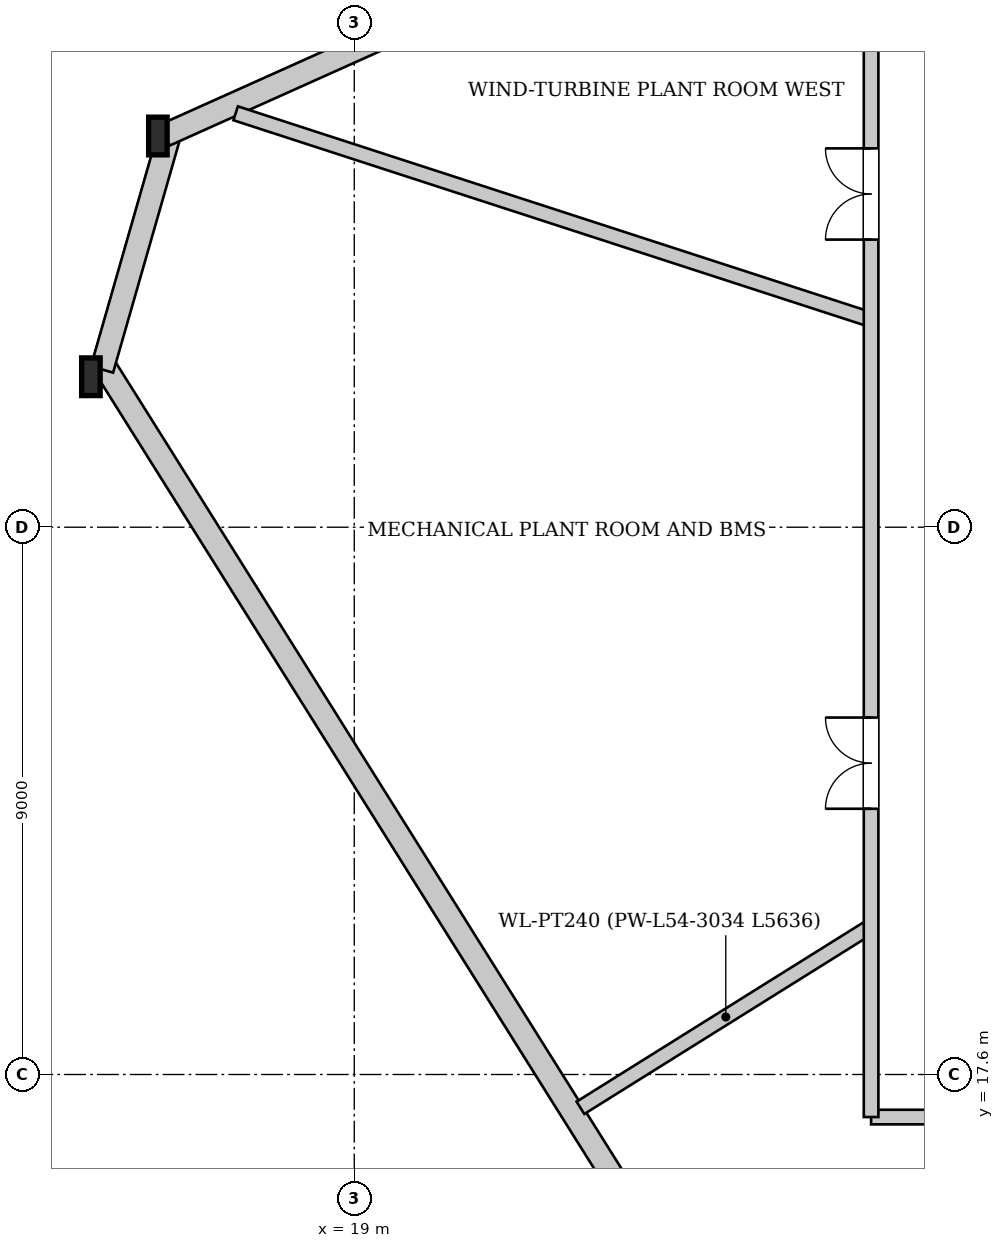
"""IFC4 building model, lengths in metres.
Left out: names, types, materials, properties, quantities, classifications, styles, units other than length and angle.
Written with IfcOpenShell. Run it as: python <this file> out.ifc"""

import sys

from ifc_helpers import new_model, si_unit, direction, frame, frame_2d, origin, origin_2d, place, context, subcontext, project, spatial, rectangle, i_section, extrude, source, transform, mapped, element, fill, save


model = new_model("IFC4")
c1 = context("Model", 3, precision=1e-05, world=origin(), true_north=direction((0.0, 1.0)))
c2 = subcontext(c1, "Body", "Model", "MODEL_VIEW")
j1 = project(units=[si_unit("LENGTHUNIT", "METRE"), si_unit("PLANEANGLEUNIT", "RADIAN")], contexts=[c1])
p1 = place(None, origin())
s1 = spatial("IfcSite", under=j1, at=p1, CompositionType="ELEMENT")
p2 = place(p1, origin())
s2 = spatial("IfcBuilding", under=s1, at=p2, CompositionType="ELEMENT")
p3 = place(p2, frame((0.0, 0.0, 204.3)))
s3 = spatial("IfcBuildingStorey", under=s2, at=p3, CompositionType="ELEMENT", Elevation=204.3)
m1 = source(origin(), c2, "Body", "SweptSolid", [
    extrude(i_section(OverallWidth=0.305, OverallDepth=0.62, WebThickness=0.021, FlangeThickness=0.04, at=origin_2d()), origin(), (0.0, 0.0, 1.0), 5.149),
])
p4 = place(p3, frame((15.809, 33.223, 0.0), z_axis=(-0.014792046228, -0.0735335375, 0.997183039482), x_axis=(0.980361267352, -0.19721000349, 0.0)))
e1 = element("IfcColumn", 1, at=p4, inside=s3, PredefinedType="COLUMN", context=c2, shape_type="MappedRepresentation", body=[
    mapped(m1, transform((0.0, 0.0, 0.0), x_axis=(1.0, 0.0, 0.0), y_axis=(0.0, 1.0, 0.0), z_axis=(0.0, 0.0, 1.0), scale=1.0)),
])
m2 = source(origin(), c2, "Body", "SweptSolid", [
    extrude(i_section(OverallWidth=0.305, OverallDepth=0.62, WebThickness=0.021, FlangeThickness=0.04, at=origin_2d()), origin(), (0.0, 0.0, 1.0), 5.146),
])
p5 = place(p3, frame((14.668, 29.247, 0.0), z_axis=(4.743756e-05, -0.066981834351, 0.997754193986), x_axis=(0.999999749216, 0.00070821512, 0.0)))
e2 = element("IfcColumn", 2, at=p5, inside=s3, PredefinedType="COLUMN", context=c2, shape_type="MappedRepresentation", body=[
    mapped(m2, transform((0.0, 0.0, 0.0), x_axis=(1.0, 0.0, 0.0), y_axis=(0.0, 1.0, 0.0), z_axis=(0.0, 0.0, 1.0), scale=1.0)),
])
p6 = place(p3, frame((24.242, 14.344, 0.0), z_axis=(0.0, 0.0, 1.0), x_axis=(-0.531419317525, 0.847108912101, 0.0)))
e3 = element("IfcWall", 3, at=p6, inside=s3, PredefinedType="SOLIDWALL", context=c2, shape_type="SweptSolid", body=[
    extrude(rectangle(XDim=17.712, YDim=0.38, at=frame_2d((8.856, 0.0))), origin(), (0.0, 0.0, 1.0), 4.572),
])
p7 = place(p3, frame((14.851, 29.194, 0.0), z_axis=(0.0, 0.0, 1.0), x_axis=(0.27564088165, 0.961260684915, 0.0)))
e4 = element("IfcWall", 4, at=p7, inside=s3, PredefinedType="SOLIDWALL", context=c2, shape_type="SweptSolid", body=[
    extrude(rectangle(XDim=4.136, YDim=0.38, at=frame_2d((2.068, 0.0))), origin(), (0.0, 0.0, 1.0), 4.572),
])
p8 = place(p3, frame((15.886, 33.05, 0.0), z_axis=(0.0, 0.0, 1.0), x_axis=(0.912383830261, 0.409335737845, 0.0)))
e5 = element("IfcWall", 5, at=p8, inside=s3, PredefinedType="SOLIDWALL", context=c2, shape_type="SweptSolid", body=[
    extrude(rectangle(XDim=22.569, YDim=0.38, at=frame_2d((11.284, 0.0))), origin(), (0.0, 0.0, 1.0), 4.572),
])
p9 = place(p3, frame((27.5, 20.039, 0.0), z_axis=(0.0, 0.0, 1.0), x_axis=(-0.848042103881, -0.529928853758, 0.0)))
e6 = element("IfcWall", 6, at=p9, inside=s3, PredefinedType="PARTITIONING", context=c2, shape_type="SweptSolid", body=[
    extrude(rectangle(XDim=5.636, YDim=0.24, at=frame_2d((2.818, 0.0))), origin(), (0.0, 0.0, 1.0), 5.08),
])
p10 = place(p3, frame((27.5, 30.012, 0.0), z_axis=(0.0, 0.0, 1.0), x_axis=(-0.951062149422, 0.308999656855, 0.0)))
e7 = element("IfcWall", 7, at=p10, inside=s3, PredefinedType="PARTITIONING", context=c2, shape_type="SweptSolid", body=[
    extrude(rectangle(XDim=10.988, YDim=0.24, at=frame_2d((5.494, 0.0))), origin(), (0.0, 0.0, 1.0), 5.08),
])
p11 = place(p3, frame((27.5, 16.9, 0.0), z_axis=(0.0, 0.0, 1.0), x_axis=(1.0, 0.0, 0.0)))
e8 = element("IfcWall", 8, at=p11, inside=s3, PredefinedType="PARTITIONING", context=c2, shape_type="SweptSolid", body=[
    extrude(rectangle(XDim=21.0, YDim=0.24, at=frame_2d((10.5, 0.0))), origin(), (0.0, 0.0, 1.0), 5.08),
])
p12 = place(p11, frame((5.64, 0.0, 0.0)))
e9 = element("IfcOpeningElement", 9, at=p12, cuts=e8, PredefinedType="OPENING", context=c2, shape_type="SweptSolid", body=[
    extrude(rectangle(XDim=1.32, YDim=2.2, at=frame_2d((0.66, 1.1))), frame((0.0, 0.13, 0.0), z_axis=(0.0, -1.0, 0.0), x_axis=(1.0, 0.0, 0.0)), (0.0, 0.0, 1.0), 0.26),
])
p13 = place(p11, frame((14.04, 0.0, 0.0)))
e10 = element("IfcOpeningElement", 10, at=p13, cuts=e8, PredefinedType="OPENING", context=c2, shape_type="SweptSolid", body=[
    extrude(rectangle(XDim=1.5, YDim=2.25, at=frame_2d((0.75, 1.125))), frame((0.0, 0.13, 0.0), z_axis=(0.0, -1.0, 0.0), x_axis=(1.0, 0.0, 0.0)), (0.0, 0.0, 1.0), 0.26),
])
p14 = place(p3, frame((27.5, 16.9, 0.0), z_axis=(0.0, 0.0, 1.0), x_axis=(0.0, 1.0, 0.0)))
e11 = element("IfcWall", 11, at=p14, inside=s3, PredefinedType="PARTITIONING", context=c2, shape_type="SweptSolid", body=[
    extrude(rectangle(XDim=19.4, YDim=0.24, at=frame_2d((9.7, 0.0))), origin(), (0.0, 0.0, 1.0), 5.08),
])
p15 = place(p14, frame((5.07, 0.0, 0.0)))
e12 = element("IfcOpeningElement", 12, at=p15, cuts=e11, PredefinedType="OPENING", context=c2, shape_type="SweptSolid", body=[
    extrude(rectangle(XDim=1.5, YDim=2.25, at=frame_2d((0.75, 1.125))), frame((0.0, 0.13, 0.0), z_axis=(0.0, -1.0, 0.0), x_axis=(1.0, 0.0, 0.0)), (0.0, 0.0, 1.0), 0.26),
])
p16 = place(p14, frame((14.43, 0.0, 0.0)))
e13 = element("IfcOpeningElement", 13, at=p16, cuts=e11, PredefinedType="OPENING", context=c2, shape_type="SweptSolid", body=[
    extrude(rectangle(XDim=1.5, YDim=2.25, at=frame_2d((0.75, 1.125))), frame((0.0, 0.13, 0.0), z_axis=(0.0, -1.0, 0.0), x_axis=(1.0, 0.0, 0.0)), (0.0, 0.0, 1.0), 0.26),
])
m3 = source(origin(), c2, "Body", "SweptSolid", [
    extrude(rectangle(XDim=1.5, YDim=2.25, at=frame_2d((0.75, 1.125))), frame((0.0, 0.025, 0.0), z_axis=(0.0, -1.0, 0.0), x_axis=(1.0, 0.0, 0.0)), (0.0, 0.0, 1.0), 0.05),
])
p17 = place(p15, origin())
e14 = element("IfcDoor", 14, at=p17, inside=s3, OperationType="DOUBLE_DOOR_SINGLE_SWING", PredefinedType="DOOR", context=c2, shape_type="MappedRepresentation", body=[
    mapped(m3, transform((0.0, 0.0, 0.0), x_axis=(1.0, 0.0, 0.0), y_axis=(0.0, 1.0, 0.0), z_axis=(0.0, 0.0, 1.0), scale=1.0)),
])
fill(e12, e14)
p18 = place(p16, origin())
e15 = element("IfcDoor", 15, at=p18, inside=s3, OperationType="DOUBLE_DOOR_SINGLE_SWING", PredefinedType="DOOR", context=c2, shape_type="MappedRepresentation", body=[
    mapped(m3, transform((0.0, 0.0, 0.0), x_axis=(1.0, 0.0, 0.0), y_axis=(0.0, 1.0, 0.0), z_axis=(0.0, 0.0, 1.0), scale=1.0)),
])
fill(e13, e15)
save(model, sys.argv[1])
